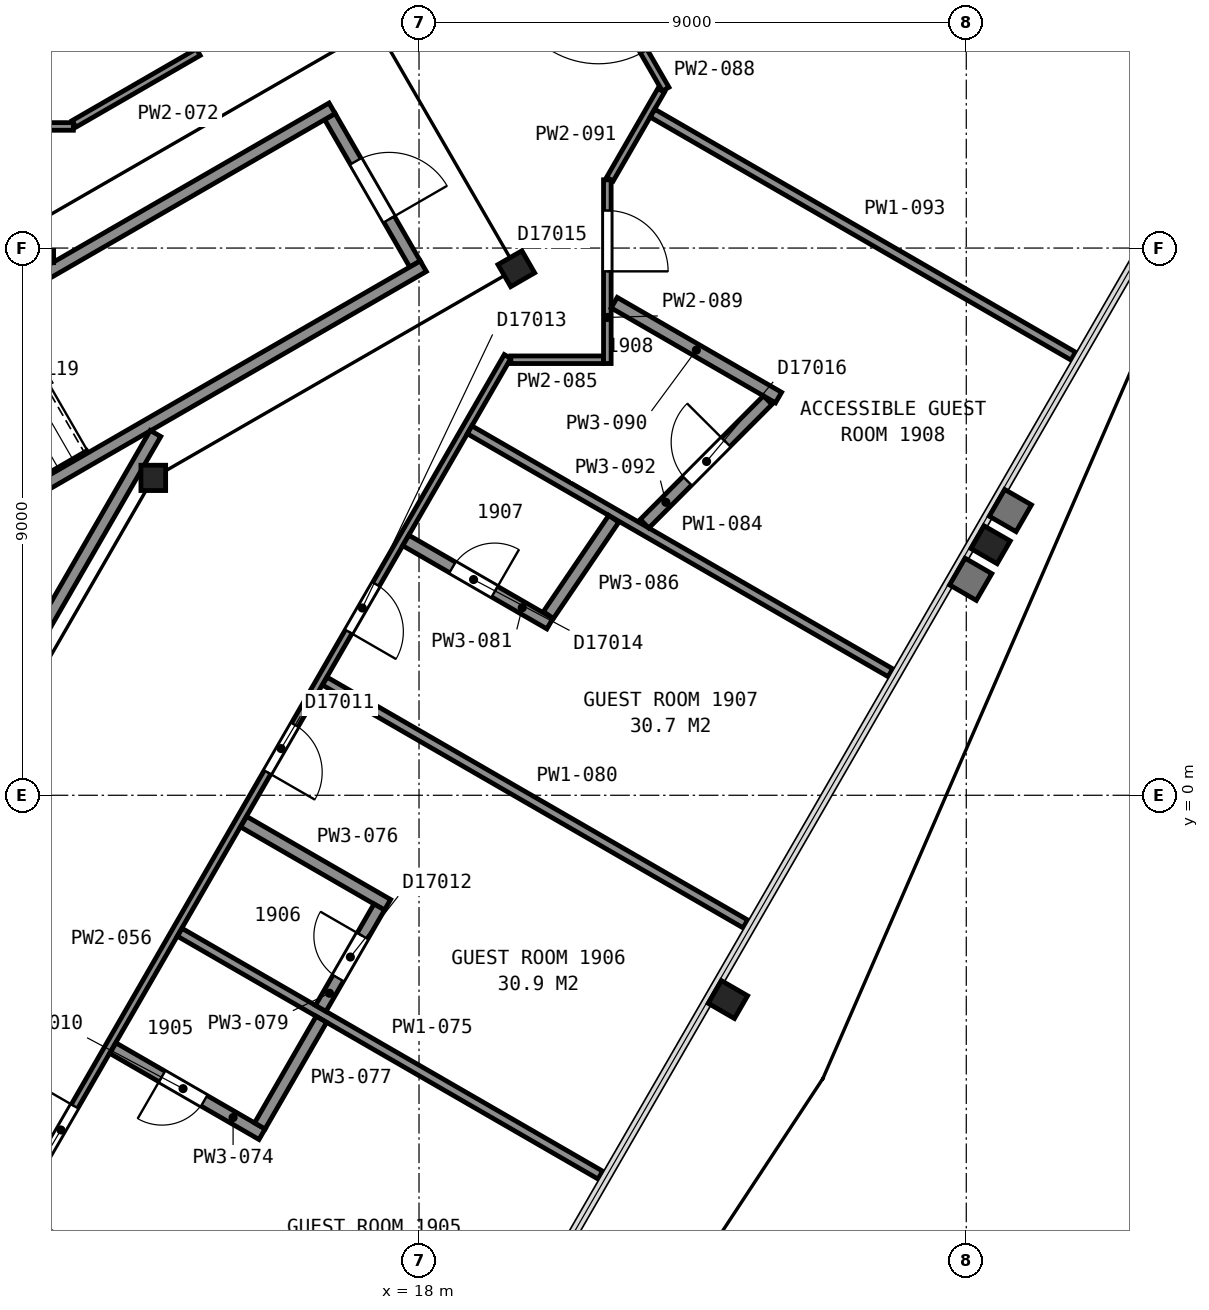
"""IFC4 building model, lengths in metres.
Left out: names, types, materials, properties, quantities, classifications, styles, units other than length and angle.
Written with IfcOpenShell. Run it as: python <this file> out.ifc"""

import sys

from ifc_helpers import new_model, si_unit, direction, frame, frame_2d, origin, origin_2d, place, context, subcontext, project, spatial, rectangle, i_section, extrude, element, fill, save


model = new_model("IFC4")
c1 = context("Model", 3, precision=1e-05, world=origin(), true_north=direction((0.0, 1.0)))
c2 = subcontext(c1, "Body", "Model", "MODEL_VIEW")
j1 = project(units=[si_unit("LENGTHUNIT", "METRE"), si_unit("PLANEANGLEUNIT", "RADIAN")], contexts=[c1])
p1 = place(None, origin())
s1 = spatial("IfcSite", under=j1, at=p1, CompositionType="ELEMENT")
p2 = place(p1, origin())
s2 = spatial("IfcBuilding", under=s1, at=p2, CompositionType="ELEMENT")
p3 = place(p2, frame((0.0, 0.0, 83.6)))
s3 = spatial("IfcBuildingStorey", under=s2, at=p3, CompositionType="ELEMENT", Elevation=83.6)
for number, where, z_axis, x_axis in (
    (1, (23.08, -3.36, 0.0), (0.0, 0.0, 1.0), (-0.5, -0.866, 0.0)),
    (2, (27.4, 4.12, 0.0), (0.0, 0.0, 1.0), (-0.5, -0.866, 0.0)),
):
    element("IfcColumn", number, at=place(p3, frame(where, z_axis=z_axis, x_axis=x_axis)), inside=s3, PredefinedType="COLUMN", context=c2, shape_type="SweptSolid", body=[
        extrude(i_section(OverallWidth=0.432, OverallDepth=0.498, WebThickness=0.056, FlangeThickness=0.089, FilletRadius=0.015, at=origin_2d()), origin(), (0.0, 0.0, 1.0), 2.87),
    ])
p4 = place(p3, frame((13.63, 5.22, 0.0), z_axis=(0.0, 0.0, 1.0), x_axis=(1.0, 0.0, 0.0)))
e3 = element("IfcColumn", 3, at=p4, inside=s3, PredefinedType="COLUMN", context=c2, shape_type="SweptSolid", body=[
    extrude(i_section(OverallWidth=0.406, OverallDepth=0.417, WebThickness=0.03, FlangeThickness=0.048, FilletRadius=0.015, at=origin_2d()), origin(), (0.0, 0.0, 1.0), 3.6),
])
p5 = place(p3, frame((19.6, 8.66, 0.0), z_axis=(0.0, 0.0, 1.0), x_axis=(0.5, -0.866025403784, 0.0)))
e4 = element("IfcColumn", 4, at=p5, inside=s3, PredefinedType="COLUMN", context=c2, shape_type="SweptSolid", body=[
    extrude(i_section(OverallWidth=0.419, OverallDepth=0.455, WebThickness=0.042, FlangeThickness=0.068, FilletRadius=0.015, at=origin_2d()), origin(), (0.0, 0.0, 1.0), 3.6),
])
p6 = place(p3, frame((17.934, 8.738, 0.0), z_axis=(0.0, 0.0, 1.0), x_axis=(-0.49998411664, 0.866034573852, 0.0)))
e5 = element("IfcWall", 5, at=p6, inside=s3, PredefinedType="PARTITIONING", context=c2, shape_type="SweptSolid", body=[
    extrude(rectangle(XDim=2.8, YDim=0.2, at=frame_2d((1.4, 0.0))), origin(), (0.0, 0.0, 1.0), 3.35),
])
p7 = place(p6, frame((0.85, 0.0, 0.0)))
e6 = element("IfcOpeningElement", 6, at=p7, cuts=e5, PredefinedType="OPENING", context=c2, shape_type="SweptSolid", body=[
    extrude(rectangle(XDim=1.1, YDim=2.1, at=frame_2d((0.55, 1.05))), frame((0.0, 0.11, 0.0), z_axis=(0.0, -1.0, 0.0), x_axis=(1.0, 0.0, 0.0)), (0.0, 0.0, 1.0), 0.22),
])
for number, where, z_axis, x_axis in (
    (7, (6.178, 5.299, 0.0), (0.0, 0.0, 1.0), (0.866, 0.5, 0.0)),
    (8, (7.678, 2.701, 0.0), (0.0, 0.0, 1.0), (0.866, 0.5, 0.0)),
):
    element("IfcWall", number, at=place(p3, frame(where, z_axis=z_axis, x_axis=x_axis)), inside=s3, PredefinedType="PARTITIONING", context=c2, shape_type="SweptSolid", body=[
        extrude(rectangle(XDim=12.0, YDim=0.2, at=frame_2d((6.0, 0.0))), origin(), (0.0, 0.0, 1.0), 3.35),
    ])
p8 = place(p3, frame((6.177, 8.86, 0.0), z_axis=(0.0, 0.0, 1.0), x_axis=(1.0, 0.0, 0.0)))
e9 = element("IfcWall", 9, at=p8, inside=s3, PredefinedType="PARTITIONING", context=c2, shape_type="SweptSolid", body=[
    extrude(rectangle(XDim=5.814, YDim=0.2, at=frame_2d((2.907, 0.0))), origin(), (0.0, 0.0, 1.0), 3.35),
])
p9 = place(p3, frame((8.492, -3.012, 0.0), z_axis=(0.0, 0.0, 1.0), x_axis=(0.499972957231, 0.866041016371, 0.0)))
e10 = element("IfcWall", 10, at=p9, inside=s3, PredefinedType="PARTITIONING", context=c2, shape_type="SweptSolid", body=[
    extrude(rectangle(XDim=10.349, YDim=0.2, at=frame_2d((5.174, 0.0))), origin(), (0.0, 0.0, 1.0), 3.35),
])
p10 = place(p3, frame((-12.315, 11.0, 0.0), z_axis=(0.0, 0.0, 1.0), x_axis=(1.0, 0.0, 0.0)))
e11 = element("IfcWall", 11, at=p10, inside=s3, PredefinedType="PARTITIONING", context=c2, shape_type="SweptSolid", body=[
    extrude(rectangle(XDim=24.631, YDim=0.125, at=frame_2d((12.315, 0.0))), origin(), (0.0, 0.0, 1.0), 2.262),
])
p11 = place(p10, frame((11.812, 0.0, 0.0)))
e12 = element("IfcOpeningElement", 12, at=p11, cuts=e11, PredefinedType="OPENING", context=c2, shape_type="SweptSolid", body=[
    extrude(rectangle(XDim=1.0, YDim=2.1, at=frame_2d((0.5, 1.05))), frame((0.0, 0.073, 0.0), z_axis=(0.0, -1.0, 0.0), x_axis=(1.0, 0.0, 0.0)), (0.0, 0.0, 1.0), 0.145),
])
p12 = place(p3, frame((19.456, 7.217, 0.0), z_axis=(0.0, 0.0, 1.0), x_axis=(-0.50002170027, -0.866012874765, 0.0)))
e13 = element("IfcWall", 13, at=p12, inside=s3, PredefinedType="PARTITIONING", context=c2, shape_type="SweptSolid", body=[
    extrude(rectangle(XDim=31.379, YDim=0.125, at=frame_2d((15.69, 0.0))), origin(), (0.0, 0.0, 1.0), 2.262),
])
p13 = place(p12, frame((26.843, 0.0, 0.0)))
e14 = element("IfcOpeningElement", 14, at=p13, cuts=e13, PredefinedType="OPENING", context=c2, shape_type="SweptSolid", body=[
    extrude(rectangle(XDim=1.0, YDim=2.1, at=frame_2d((0.5, 1.05))), frame((0.0, 0.073, 0.0), z_axis=(0.0, -1.0, 0.0), x_axis=(1.0, 0.0, 0.0)), (0.0, 0.0, 1.0), 0.145),
])
p14 = place(p12, frame((24.03, 0.0, 0.0)))
e15 = element("IfcOpeningElement", 15, at=p14, cuts=e13, PredefinedType="OPENING", context=c2, shape_type="SweptSolid", body=[
    extrude(rectangle(XDim=0.9, YDim=2.1, at=frame_2d((0.45, 1.05))), frame((0.0, 0.073, 0.0), z_axis=(0.0, -1.0, 0.0), x_axis=(1.0, 0.0, 0.0)), (0.0, 0.0, 1.0), 0.145),
])
p15 = place(p12, frame((17.159, 0.0, 0.0)))
e16 = element("IfcOpeningElement", 16, at=p15, cuts=e13, PredefinedType="OPENING", context=c2, shape_type="SweptSolid", body=[
    extrude(rectangle(XDim=0.9, YDim=2.1, at=frame_2d((0.45, 1.05))), frame((0.0, 0.073, 0.0), z_axis=(0.0, -1.0, 0.0), x_axis=(1.0, 0.0, 0.0)), (0.0, 0.0, 1.0), 0.145),
])
p16 = place(p12, frame((14.24, 0.0, 0.0)))
e17 = element("IfcOpeningElement", 17, at=p16, cuts=e13, PredefinedType="OPENING", context=c2, shape_type="SweptSolid", body=[
    extrude(rectangle(XDim=0.9, YDim=2.1, at=frame_2d((0.45, 1.05))), frame((0.0, 0.073, 0.0), z_axis=(0.0, -1.0, 0.0), x_axis=(1.0, 0.0, 0.0)), (0.0, 0.0, 1.0), 0.145),
])
p17 = place(p12, frame((6.997, 0.0, 0.0)))
e18 = element("IfcOpeningElement", 18, at=p17, cuts=e13, PredefinedType="OPENING", context=c2, shape_type="SweptSolid", body=[
    extrude(rectangle(XDim=0.9, YDim=2.1, at=frame_2d((0.45, 1.05))), frame((0.0, 0.073, 0.0), z_axis=(0.0, -1.0, 0.0), x_axis=(1.0, 0.0, 0.0)), (0.0, 0.0, 1.0), 0.145),
])
p18 = place(p12, frame((4.327, 0.0, 0.0)))
e19 = element("IfcOpeningElement", 19, at=p18, cuts=e13, PredefinedType="OPENING", context=c2, shape_type="SweptSolid", body=[
    extrude(rectangle(XDim=0.9, YDim=2.1, at=frame_2d((0.45, 1.05))), frame((0.0, 0.073, 0.0), z_axis=(0.0, -1.0, 0.0), x_axis=(1.0, 0.0, 0.0)), (0.0, 0.0, 1.0), 0.145),
])
p19 = place(p3, frame((11.365, -6.921, 0.0), z_axis=(0.0, 0.0, 1.0), x_axis=(0.866008543052, -0.500029202507, 0.0)))
e20 = element("IfcWall", 20, at=p19, inside=s3, PredefinedType="PARTITIONING", context=c2, shape_type="SweptSolid", body=[
    extrude(rectangle(XDim=7.992, YDim=0.15, at=frame_2d((3.996, 0.0))), origin(), (0.0, 0.0, 1.0), 2.262),
])
p20 = place(p3, frame((12.327, 11.042, 0.0), z_axis=(0.0, 0.0, 1.0), x_axis=(0.866063239147, 0.499934461503, 0.0)))
e21 = element("IfcWall", 21, at=p20, inside=s3, PredefinedType="PARTITIONING", context=c2, shape_type="SweptSolid", body=[
    extrude(rectangle(XDim=2.359, YDim=0.125, at=frame_2d((1.18, 0.0))), origin(), (0.0, 0.0, 1.0), 2.262),
])
p21 = place(p3, frame((12.966, -4.159, 0.0), z_axis=(0.0, 0.0, 1.0), x_axis=(0.866033446572, -0.499986069224, 0.0)))
e22 = element("IfcWall", 22, at=p21, inside=s3, PredefinedType="PARTITIONING", context=c2, shape_type="SweptSolid", body=[
    extrude(rectangle(XDim=2.833, YDim=0.2, at=frame_2d((1.416, 0.0))), origin(), (0.0, 0.0, 1.0), 2.262),
])
p22 = place(p21, frame((0.933, 0.0, 0.0)))
e23 = element("IfcOpeningElement", 23, at=p22, cuts=e22, PredefinedType="OPENING", context=c2, shape_type="SweptSolid", body=[
    extrude(rectangle(XDim=0.8, YDim=2.1, at=frame_2d((0.4, 1.05))), frame((0.0, 0.11, 0.0), z_axis=(0.0, -1.0, 0.0), x_axis=(1.0, 0.0, 0.0)), (0.0, 0.0, 1.0), 0.22),
])
p23 = place(p3, frame((14.065, -2.254, 0.0), z_axis=(0.0, 0.0, 1.0), x_axis=(0.866045096311, -0.499965889992, 0.0)))
e24 = element("IfcWall", 24, at=p23, inside=s3, PredefinedType="PARTITIONING", context=c2, shape_type="SweptSolid", body=[
    extrude(rectangle(XDim=7.987, YDim=0.15, at=frame_2d((3.993, 0.0))), origin(), (0.0, 0.0, 1.0), 2.262),
])
p24 = place(p3, frame((15.115, -0.435, 0.0), z_axis=(0.0, 0.0, 1.0), x_axis=(0.866102295869, -0.499866795347, 0.0)))
e25 = element("IfcWall", 25, at=p24, inside=s3, PredefinedType="PARTITIONING", context=c2, shape_type="SweptSolid", body=[
    extrude(rectangle(XDim=2.733, YDim=0.2, at=frame_2d((1.367, 0.0))), origin(), (0.0, 0.0, 1.0), 2.262),
])
p25 = place(p3, frame((15.382, -5.438, 0.0), z_axis=(0.0, 0.0, 1.0), x_axis=(0.500042536776, 0.866000843773, 0.0)))
e26 = element("IfcWall", 26, at=p25, inside=s3, PredefinedType="PARTITIONING", context=c2, shape_type="SweptSolid", body=[
    extrude(rectangle(XDim=2.025, YDim=0.2, at=frame_2d((1.012, 0.0))), origin(), (0.0, 0.0, 1.0), 2.262),
])
p26 = place(p3, frame((16.384, -3.505, 0.0), z_axis=(0.0, 0.0, 1.0), x_axis=(0.499876134923, 0.86609690551, 0.0)))
e27 = element("IfcWall", 27, at=p26, inside=s3, PredefinedType="PARTITIONING", context=c2, shape_type="SweptSolid", body=[
    extrude(rectangle(XDim=1.925, YDim=0.2, at=frame_2d((0.963, 0.0))), origin(), (0.0, 0.0, 1.0), 2.262),
])
p27 = place(p26, frame((0.575, 0.0, 0.0)))
e28 = element("IfcOpeningElement", 28, at=p27, cuts=e27, PredefinedType="OPENING", context=c2, shape_type="SweptSolid", body=[
    extrude(rectangle(XDim=0.8, YDim=2.1, at=frame_2d((0.4, 1.05))), frame((0.0, 0.11, 0.0), z_axis=(0.0, -1.0, 0.0), x_axis=(1.0, 0.0, 0.0)), (0.0, 0.0, 1.0), 0.22),
])
p28 = place(p3, frame((16.45, 1.877, 0.0), z_axis=(0.0, 0.0, 1.0), x_axis=(0.866052736899, -0.499952654668, 0.0)))
e29 = element("IfcWall", 29, at=p28, inside=s3, PredefinedType="PARTITIONING", context=c2, shape_type="SweptSolid", body=[
    extrude(rectangle(XDim=7.987, YDim=0.15, at=frame_2d((3.994, 0.0))), origin(), (0.0, 0.0, 1.0), 2.262),
])
p29 = place(p3, frame((17.782, 4.192, 0.0), z_axis=(0.0, 0.0, 1.0), x_axis=(0.866005850709, -0.50003386539, 0.0)))
e30 = element("IfcWall", 30, at=p29, inside=s3, PredefinedType="PARTITIONING", context=c2, shape_type="SweptSolid", body=[
    extrude(rectangle(XDim=2.737, YDim=0.2, at=frame_2d((1.369, 0.0))), origin(), (0.0, 0.0, 1.0), 2.262),
])
p30 = place(p29, frame((0.887, 0.0, 0.0)))
e31 = element("IfcOpeningElement", 31, at=p30, cuts=e30, PredefinedType="OPENING", context=c2, shape_type="SweptSolid", body=[
    extrude(rectangle(XDim=0.8, YDim=2.1, at=frame_2d((0.4, 1.05))), frame((0.0, 0.11, 0.0), z_axis=(0.0, -1.0, 0.0), x_axis=(1.0, 0.0, 0.0)), (0.0, 0.0, 1.0), 0.22),
])
p31 = place(p3, frame((18.832, 6.011, 0.0), z_axis=(0.0, 0.0, 1.0), x_axis=(0.866027362729, -0.499996606993, 0.0)))
e32 = element("IfcWall", 32, at=p31, inside=s3, PredefinedType="PARTITIONING", context=c2, shape_type="SweptSolid", body=[
    extrude(rectangle(XDim=7.991, YDim=0.15, at=frame_2d((3.996, 0.0))), origin(), (0.0, 0.0, 1.0), 2.262),
])
p32 = place(p3, frame((19.51, 7.163, 0.0), z_axis=(0.0, 0.0, 1.0), x_axis=(1.0, 0.0, 0.0)))
e33 = element("IfcWall", 33, at=p32, inside=s3, PredefinedType="PARTITIONING", context=c2, shape_type="SweptSolid", body=[
    extrude(rectangle(XDim=1.522, YDim=0.125, at=frame_2d((0.761, 0.0))), origin(), (0.0, 0.0, 1.0), 2.262),
])
p33 = place(p3, frame((20.128, 2.964, 0.0), z_axis=(0.0, 0.0, 1.0), x_axis=(0.561894569182, 0.827208857015, 0.0)))
e34 = element("IfcWall", 34, at=p33, inside=s3, PredefinedType="PARTITIONING", context=c2, shape_type="SweptSolid", body=[
    extrude(rectangle(XDim=1.913, YDim=0.2, at=frame_2d((0.957, 0.0))), origin(), (0.0, 0.0, 1.0), 2.262),
])
p34 = place(p3, frame((20.643, 14.063, 0.0), z_axis=(0.0, 0.0, 1.0), x_axis=(0.499647745683, -0.866228682412, 0.0)))
e35 = element("IfcWall", 35, at=p34, inside=s3, PredefinedType="PARTITIONING", context=c2, shape_type="SweptSolid", body=[
    extrude(rectangle(XDim=2.829, YDim=0.125, at=frame_2d((1.415, 0.0))), origin(), (0.0, 0.0, 1.0), 2.262),
])
p35 = place(p34, frame((0.615, 0.0, 0.0)))
e36 = element("IfcOpeningElement", 36, at=p35, cuts=e35, PredefinedType="OPENING", context=c2, shape_type="SweptSolid", body=[
    extrude(rectangle(XDim=1.5, YDim=2.1, at=frame_2d((0.75, 1.05))), frame((0.0, 0.073, 0.0), z_axis=(0.0, -1.0, 0.0), x_axis=(1.0, 0.0, 0.0)), (0.0, 0.0, 1.0), 0.145),
])
p36 = place(p3, frame((21.097, 10.123, 0.0), z_axis=(0.0, 0.0, 1.0), x_axis=(0.0, -1.0, 0.0)))
e37 = element("IfcWall", 37, at=p36, inside=s3, PredefinedType="PARTITIONING", context=c2, shape_type="SweptSolid", body=[
    extrude(rectangle(XDim=3.022, YDim=0.125, at=frame_2d((1.511, 0.0))), origin(), (0.0, 0.0, 1.0), 2.262),
])
p37 = place(p36, frame((0.506, 0.0, 0.0)))
e38 = element("IfcOpeningElement", 38, at=p37, cuts=e37, PredefinedType="OPENING", context=c2, shape_type="SweptSolid", body=[
    extrude(rectangle(XDim=1.0, YDim=2.1, at=frame_2d((0.5, 1.05))), frame((0.0, 0.073, 0.0), z_axis=(0.0, -1.0, 0.0), x_axis=(1.0, 0.0, 0.0)), (0.0, 0.0, 1.0), 0.145),
])
p38 = place(p3, frame((21.209, 8.102, 0.0), z_axis=(0.0, 0.0, 1.0), x_axis=(0.86597196262, -0.50009255139, 0.0)))
e39 = element("IfcWall", 39, at=p38, inside=s3, PredefinedType="PARTITIONING", context=c2, shape_type="SweptSolid", body=[
    extrude(rectangle(XDim=3.122, YDim=0.2, at=frame_2d((1.561, 0.0))), origin(), (0.0, 0.0, 1.0), 2.262),
])
p39 = place(p3, frame((21.139, 10.134, 0.0), z_axis=(0.0, 0.0, 1.0), x_axis=(0.500048373822, 0.865997473344, 0.0)))
e40 = element("IfcWall", 40, at=p39, inside=s3, PredefinedType="PARTITIONING", context=c2, shape_type="SweptSolid", body=[
    extrude(rectangle(XDim=1.686, YDim=0.125, at=frame_2d((0.843, 0.0))), origin(), (0.0, 0.0, 1.0), 2.262),
])
p40 = place(p3, frame((21.708, 4.466, 0.0), z_axis=(0.0, 0.0, 1.0), x_axis=(0.70578703929, 0.708424064506, 0.0)))
e41 = element("IfcWall", 41, at=p40, inside=s3, PredefinedType="PARTITIONING", context=c2, shape_type="SweptSolid", body=[
    extrude(rectangle(XDim=2.87, YDim=0.2, at=frame_2d((1.435, 0.0))), origin(), (0.0, 0.0, 1.0), 2.262),
])
p41 = place(p40, frame((0.996, 0.0, 0.0)))
e42 = element("IfcOpeningElement", 42, at=p41, cuts=e41, PredefinedType="OPENING", context=c2, shape_type="SweptSolid", body=[
    extrude(rectangle(XDim=0.9, YDim=2.1, at=frame_2d((0.45, 1.05))), frame((0.0, 0.11, 0.0), z_axis=(0.0, -1.0, 0.0), x_axis=(1.0, 0.0, 0.0)), (0.0, 0.0, 1.0), 0.22),
])
p42 = place(p3, frame((21.839, 11.219, 0.0), z_axis=(0.0, 0.0, 1.0), x_axis=(0.866019724796, -0.500009836168, 0.0)))
e43 = element("IfcWall", 43, at=p42, inside=s3, PredefinedType="PARTITIONING", context=c2, shape_type="SweptSolid", body=[
    extrude(rectangle(XDim=7.991, YDim=0.15, at=frame_2d((3.996, 0.0))), origin(), (0.0, 0.0, 1.0), 2.262),
])
p43 = place(p7, origin())
e44 = element("IfcDoor", 44, at=p43, inside=s3, OperationType="SINGLE_SWING_LEFT", PredefinedType="DOOR", context=c2, shape_type="SweptSolid", body=[
    extrude(rectangle(XDim=1.1, YDim=2.1, at=frame_2d((0.55, 1.05))), frame((0.0, 0.025, 0.0), z_axis=(0.0, -1.0, 0.0), x_axis=(1.0, 0.0, 0.0)), (0.0, 0.0, 1.0), 0.05),
])
fill(e6, e44)
p44 = place(p16, origin())
e45 = element("IfcDoor", 45, at=p44, inside=s3, OperationType="SINGLE_SWING_LEFT", PredefinedType="DOOR", context=c2, shape_type="SweptSolid", body=[
    extrude(rectangle(XDim=0.9, YDim=2.1, at=frame_2d((0.45, 1.05))), frame((0.0, 0.025, 0.0), z_axis=(0.0, -1.0, 0.0), x_axis=(1.0, 0.0, 0.0)), (0.0, 0.0, 1.0), 0.05),
])
fill(e17, e45)
p45 = place(p17, origin())
e46 = element("IfcDoor", 46, at=p45, inside=s3, OperationType="SINGLE_SWING_RIGHT", PredefinedType="DOOR", context=c2, shape_type="SweptSolid", body=[
    extrude(rectangle(XDim=0.9, YDim=2.1, at=frame_2d((0.45, 1.05))), frame((0.0, 0.025, 0.0), z_axis=(0.0, -1.0, 0.0), x_axis=(1.0, 0.0, 0.0)), (0.0, 0.0, 1.0), 0.05),
])
fill(e18, e46)
p46 = place(p18, origin())
e47 = element("IfcDoor", 47, at=p46, inside=s3, OperationType="SINGLE_SWING_RIGHT", PredefinedType="DOOR", context=c2, shape_type="SweptSolid", body=[
    extrude(rectangle(XDim=0.9, YDim=2.1, at=frame_2d((0.45, 1.05))), frame((0.0, 0.025, 0.0), z_axis=(0.0, -1.0, 0.0), x_axis=(1.0, 0.0, 0.0)), (0.0, 0.0, 1.0), 0.05),
])
fill(e19, e47)
p47 = place(p22, origin())
e48 = element("IfcDoor", 48, at=p47, inside=s3, OperationType="SINGLE_SWING_LEFT", PredefinedType="DOOR", context=c2, shape_type="SweptSolid", body=[
    extrude(rectangle(XDim=0.8, YDim=2.1, at=frame_2d((0.4, 1.05))), frame((0.0, 0.025, 0.0), z_axis=(0.0, -1.0, 0.0), x_axis=(1.0, 0.0, 0.0)), (0.0, 0.0, 1.0), 0.05),
])
fill(e23, e48)
p48 = place(p27, origin())
e49 = element("IfcDoor", 49, at=p48, inside=s3, OperationType="SINGLE_SWING_RIGHT", PredefinedType="DOOR", context=c2, shape_type="SweptSolid", body=[
    extrude(rectangle(XDim=0.8, YDim=2.1, at=frame_2d((0.4, 1.05))), frame((0.0, 0.025, 0.0), z_axis=(0.0, -1.0, 0.0), x_axis=(1.0, 0.0, 0.0)), (0.0, 0.0, 1.0), 0.05),
])
fill(e28, e49)
p49 = place(p30, origin())
e50 = element("IfcDoor", 50, at=p49, inside=s3, OperationType="SINGLE_SWING_RIGHT", PredefinedType="DOOR", context=c2, shape_type="SweptSolid", body=[
    extrude(rectangle(XDim=0.8, YDim=2.1, at=frame_2d((0.4, 1.05))), frame((0.0, 0.025, 0.0), z_axis=(0.0, -1.0, 0.0), x_axis=(1.0, 0.0, 0.0)), (0.0, 0.0, 1.0), 0.05),
])
fill(e31, e50)
p50 = place(p35, origin())
e51 = element("IfcDoor", 51, at=p50, inside=s3, OperationType="DOUBLE_DOOR_SINGLE_SWING", PredefinedType="DOOR", context=c2, shape_type="SweptSolid", body=[
    extrude(rectangle(XDim=1.5, YDim=2.1, at=frame_2d((0.75, 1.05))), frame((0.0, 0.025, 0.0), z_axis=(0.0, -1.0, 0.0), x_axis=(1.0, 0.0, 0.0)), (0.0, 0.0, 1.0), 0.05),
])
fill(e36, e51)
p51 = place(p37, origin())
e52 = element("IfcDoor", 52, at=p51, inside=s3, OperationType="SINGLE_SWING_RIGHT", PredefinedType="DOOR", context=c2, shape_type="SweptSolid", body=[
    extrude(rectangle(XDim=1.0, YDim=2.1, at=frame_2d((0.5, 1.05))), frame((0.0, 0.025, 0.0), z_axis=(0.0, -1.0, 0.0), x_axis=(1.0, 0.0, 0.0)), (0.0, 0.0, 1.0), 0.05),
])
fill(e38, e52)
p52 = place(p41, origin())
e53 = element("IfcDoor", 53, at=p52, inside=s3, OperationType="SINGLE_SWING_RIGHT", PredefinedType="DOOR", context=c2, shape_type="SweptSolid", body=[
    extrude(rectangle(XDim=0.9, YDim=2.1, at=frame_2d((0.45, 1.05))), frame((0.0, 0.025, 0.0), z_axis=(0.0, -1.0, 0.0), x_axis=(1.0, 0.0, 0.0)), (0.0, 0.0, 1.0), 0.05),
])
fill(e42, e53)
save(model, sys.argv[1])
